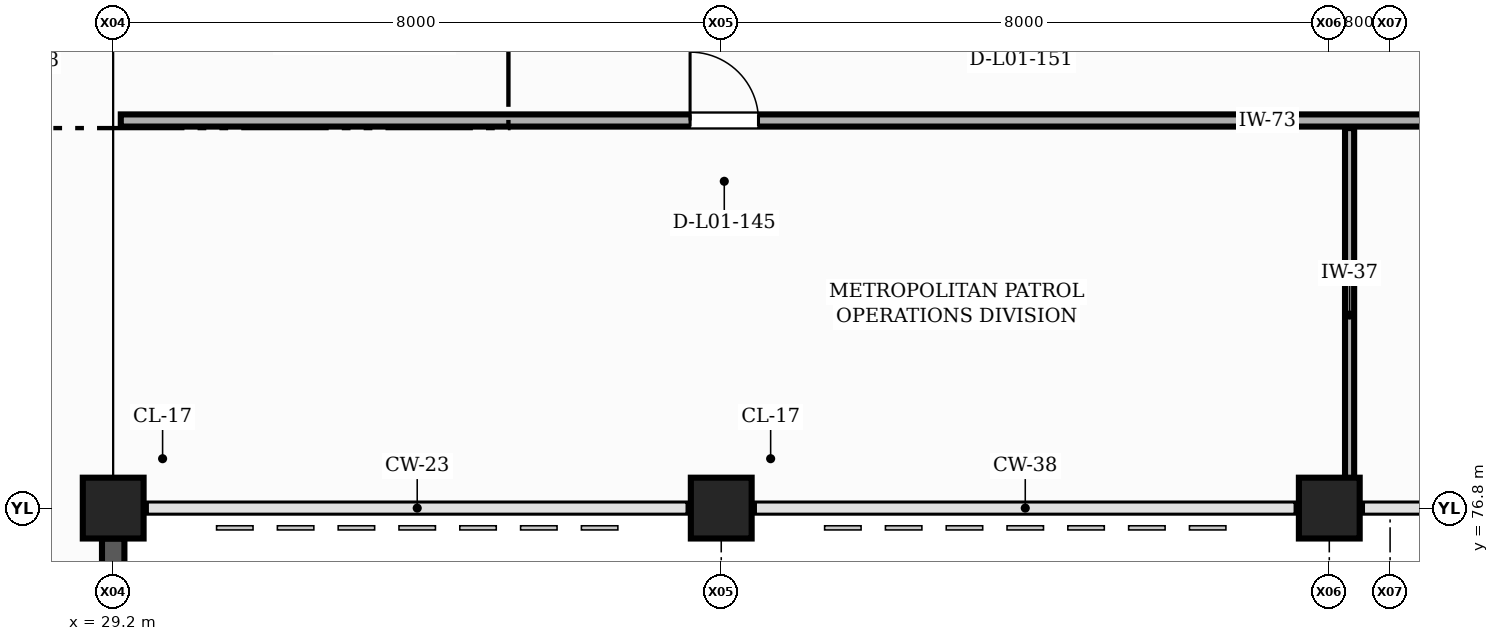
"""IFC4 building model, lengths in metres.
Left out: names, types, materials, properties, quantities, classifications, styles, units other than length and angle.
Written with IfcOpenShell. Run it as: python <this file> out.ifc"""

import sys

from ifc_helpers import new_model, si_unit, direction, frame, frame_2d, origin, origin_2d, place, context, subcontext, project, spatial, rectangle, extrude, element, fill, save


model = new_model("IFC4")
c1 = context("Model", 3, precision=1e-05, world=origin(), true_north=direction((0.0, 1.0)))
c2 = subcontext(c1, "Body", "Model", "MODEL_VIEW")
j1 = project(units=[si_unit("LENGTHUNIT", "METRE"), si_unit("PLANEANGLEUNIT", "RADIAN")], contexts=[c1])
p1 = place(None, origin())
s1 = spatial("IfcSite", under=j1, at=p1, CompositionType="ELEMENT")
p2 = place(p1, origin())
s2 = spatial("IfcBuilding", under=s1, at=p2, CompositionType="ELEMENT")
p3 = place(p2, frame((0.0, 0.0, 4.8)))
s3 = spatial("IfcBuildingStorey", under=s2, at=p3, CompositionType="ELEMENT", Elevation=4.8)
for number, where, z_axis, x_axis in (
    (1, (29.2, 76.8, 0.0), (0.0, 0.0, 1.0), (1.0, 0.0, 0.0)),
    (2, (37.2, 76.8, 0.0), (0.0, 0.0, 1.0), (1.0, 0.0, 0.0)),
    (3, (45.2, 76.8, 0.0), (0.0, 0.0, 1.0), (1.0, 0.0, 0.0)),
):
    element("IfcColumn", number, at=place(p3, frame(where, z_axis=z_axis, x_axis=x_axis)), inside=s3, PredefinedType="COLUMN", context=c2, shape_type="SweptSolid", body=[
        extrude(rectangle(XDim=0.8, YDim=0.8, at=origin_2d()), origin(), (0.0, 0.0, 1.0), 4.2),
    ])
p4 = place(p3, frame((29.2, 69.2, 0.0), z_axis=(0.0, 0.0, 1.0), x_axis=(0.0, 1.0, 0.0)))
e4 = element("IfcWall", 4, at=p4, inside=s3, PredefinedType="SOLIDWALL", context=c2, shape_type="SweptSolid", body=[
    extrude(rectangle(XDim=7.2, YDim=0.295, at=frame_2d((3.6, 0.0))), origin(), (0.0, 0.0, 1.0), 3.26),
])
p5 = place(p4, frame((2.8, 0.0, 0.9)))
e5 = element("IfcOpeningElement", 5, at=p5, cuts=e4, PredefinedType="OPENING", context=c2, shape_type="SweptSolid", body=[
    extrude(rectangle(XDim=1.6, YDim=2.1, at=frame_2d((0.8, 1.05))), frame((0.0, 0.157, 0.0), z_axis=(0.0, -1.0, 0.0), x_axis=(1.0, 0.0, 0.0)), (0.0, 0.0, 1.0), 0.315),
])
p6 = place(p3, frame((45.467, 76.88, 0.0), z_axis=(0.0, 0.0, 1.0), x_axis=(0.0, 1.0, 0.0)))
e6 = element("IfcWall", 6, at=p6, inside=s3, PredefinedType="PARTITIONING", context=c2, shape_type="SweptSolid", body=[
    extrude(rectangle(XDim=4.92, YDim=0.12, at=frame_2d((2.46, 0.0))), origin(), (0.0, 0.0, 1.0), 3.195),
])
p7 = place(p3, frame((29.3, 81.9, 0.0), z_axis=(0.0, 0.0, 1.0), x_axis=(1.0, 0.0, 0.0)))
e7 = element("IfcWall", 7, at=p7, inside=s3, PredefinedType="PARTITIONING", context=c2, shape_type="SweptSolid", body=[
    extrude(rectangle(XDim=72.62, YDim=0.16, at=frame_2d((36.31, 0.0))), origin(), (0.0, 0.0, 1.0), 3.195),
])
p8 = place(p7, frame((7.49, 0.0, 0.0)))
e8 = element("IfcOpeningElement", 8, at=p8, cuts=e7, PredefinedType="OPENING", context=c2, shape_type="SweptSolid", body=[
    extrude(rectangle(XDim=0.9, YDim=2.1, at=frame_2d((0.45, 1.05))), frame((0.0, 0.09, 0.0), z_axis=(0.0, -1.0, 0.0), x_axis=(1.0, 0.0, 0.0)), (0.0, 0.0, 1.0), 0.18),
])
p9 = place(p7, frame((22.09, 0.0, 0.0)))
e9 = element("IfcOpeningElement", 9, at=p9, cuts=e7, PredefinedType="OPENING", context=c2, shape_type="SweptSolid", body=[
    extrude(rectangle(XDim=0.92, YDim=2.1, at=frame_2d((0.46, 1.05))), frame((0.0, 0.09, 0.0), z_axis=(0.0, -1.0, 0.0), x_axis=(1.0, 0.0, 0.0)), (0.0, 0.0, 1.0), 0.18),
])
p10 = place(p7, frame((34.65, 0.0, 0.0)))
e10 = element("IfcOpeningElement", 10, at=p10, cuts=e7, PredefinedType="OPENING", context=c2, shape_type="SweptSolid", body=[
    extrude(rectangle(XDim=0.95, YDim=2.1, at=frame_2d((0.475, 1.05))), frame((0.0, 0.09, 0.0), z_axis=(0.0, -1.0, 0.0), x_axis=(1.0, 0.0, 0.0)), (0.0, 0.0, 1.0), 0.18),
])
p11 = place(p7, frame((46.19, 0.0, 0.0)))
e11 = element("IfcOpeningElement", 11, at=p11, cuts=e7, PredefinedType="OPENING", context=c2, shape_type="SweptSolid", body=[
    extrude(rectangle(XDim=0.98, YDim=2.12, at=frame_2d((0.49, 1.06))), frame((0.0, 0.09, 0.0), z_axis=(0.0, -1.0, 0.0), x_axis=(1.0, 0.0, 0.0)), (0.0, 0.0, 1.0), 0.18),
])
p12 = place(p7, frame((56.74, 0.0, 0.0)))
e12 = element("IfcOpeningElement", 12, at=p12, cuts=e7, PredefinedType="OPENING", context=c2, shape_type="SweptSolid", body=[
    extrude(rectangle(XDim=1.0, YDim=2.1, at=frame_2d((0.5, 1.05))), frame((0.0, 0.09, 0.0), z_axis=(0.0, -1.0, 0.0), x_axis=(1.0, 0.0, 0.0)), (0.0, 0.0, 1.0), 0.18),
])
p13 = place(p7, frame((66.82, 0.0, 0.0)))
e13 = element("IfcOpeningElement", 13, at=p13, cuts=e7, PredefinedType="OPENING", context=c2, shape_type="SweptSolid", body=[
    extrude(rectangle(XDim=1.02, YDim=2.12, at=frame_2d((0.51, 1.06))), frame((0.0, 0.09, 0.0), z_axis=(0.0, -1.0, 0.0), x_axis=(1.0, 0.0, 0.0)), (0.0, 0.0, 1.0), 0.18),
])
p14 = place(p8, origin())
e14 = element("IfcDoor", 14, at=p14, inside=s3, OperationType="SINGLE_SWING_LEFT", PredefinedType="DOOR", context=c2, shape_type="SweptSolid", body=[
    extrude(rectangle(XDim=0.9, YDim=2.1, at=frame_2d((0.45, 1.05))), frame((0.0, 0.025, 0.0), z_axis=(0.0, -1.0, 0.0), x_axis=(1.0, 0.0, 0.0)), (0.0, 0.0, 1.0), 0.05),
])
fill(e8, e14)
save(model, sys.argv[1])
